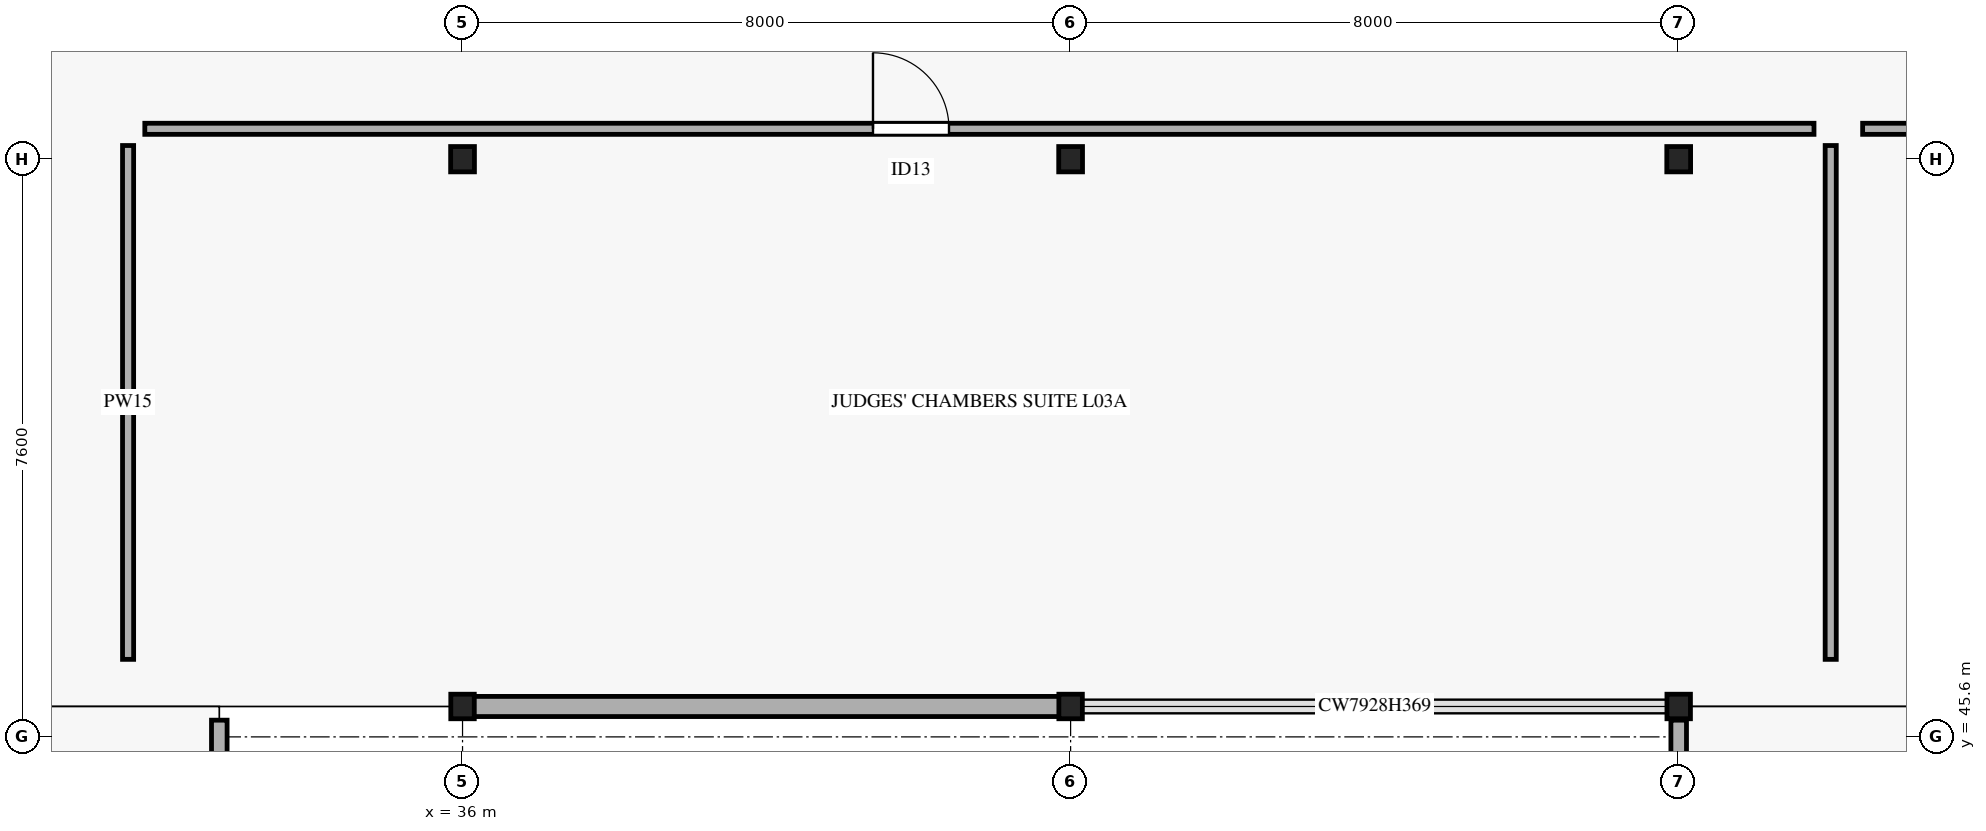
"""IFC4 building model, lengths in metres.
Left out: names, types, materials, properties, quantities, classifications, styles, units other than length and angle.
Written with IfcOpenShell. Run it as: python <this file> out.ifc"""

import sys

from ifc_helpers import new_model, si_unit, direction, frame, frame_2d, origin, origin_2d, place, context, subcontext, project, spatial, rectangle, i_section, extrude, element, fill, save


model = new_model("IFC4")
c1 = context("Model", 3, precision=1e-05, world=origin(), true_north=direction((0.0, 1.0)))
c2 = subcontext(c1, "Body", "Model", "MODEL_VIEW")
j1 = project(units=[si_unit("LENGTHUNIT", "METRE"), si_unit("PLANEANGLEUNIT", "RADIAN")], contexts=[c1])
p1 = place(None, origin())
s1 = spatial("IfcSite", under=j1, at=p1, CompositionType="ELEMENT")
p2 = place(p1, origin())
s2 = spatial("IfcBuilding", under=s1, at=p2, CompositionType="ELEMENT")
p3 = place(p2, frame((0.0, 0.0, 15.6)))
s3 = spatial("IfcBuildingStorey", under=s2, at=p3, CompositionType="ELEMENT", Elevation=15.6)
p4 = place(p3, frame((36.0, 46.0, 0.0), z_axis=(0.0, 0.0, 1.0), x_axis=(1.0, 0.0, 0.0)))
e1 = element("IfcColumn", 1, at=p4, inside=s3, PredefinedType="COLUMN", context=c2, shape_type="SweptSolid", body=[
    extrude(i_section(OverallWidth=0.309, OverallDepth=0.323, WebThickness=0.014, FlangeThickness=0.023, FilletRadius=0.015, at=origin_2d()), origin(), (0.0, 0.0, 1.0), 4.59),
])
p5 = place(p3, frame((36.0, 53.2, 0.0), z_axis=(0.0, 0.0, 1.0), x_axis=(1.0, 0.0, 0.0)))
e2 = element("IfcColumn", 2, at=p5, inside=s3, PredefinedType="COLUMN", context=c2, shape_type="SweptSolid", body=[
    extrude(i_section(OverallWidth=0.313, OverallDepth=0.333, WebThickness=0.018, FlangeThickness=0.028, FilletRadius=0.015, at=origin_2d()), origin(), (0.0, 0.0, 1.0), 4.59),
])
p6 = place(p3, frame((44.0, 46.0, 0.0), z_axis=(0.0, 0.0, 1.0), x_axis=(1.0, 0.0, 0.0)))
e3 = element("IfcColumn", 3, at=p6, inside=s3, PredefinedType="COLUMN", context=c2, shape_type="SweptSolid", body=[
    extrude(i_section(OverallWidth=0.309, OverallDepth=0.323, WebThickness=0.014, FlangeThickness=0.023, FilletRadius=0.015, at=origin_2d()), origin(), (0.0, 0.0, 1.0), 4.59),
])
p7 = place(p3, frame((44.0, 53.2, 0.0), z_axis=(0.0, 0.0, 1.0), x_axis=(1.0, 0.0, 0.0)))
e4 = element("IfcColumn", 4, at=p7, inside=s3, PredefinedType="COLUMN", context=c2, shape_type="SweptSolid", body=[
    extrude(i_section(OverallWidth=0.313, OverallDepth=0.333, WebThickness=0.018, FlangeThickness=0.028, FilletRadius=0.015, at=origin_2d()), origin(), (0.0, 0.0, 1.0), 4.59),
])
p8 = place(p3, frame((52.0, 46.0, 0.0), z_axis=(0.0, 0.0, 1.0), x_axis=(1.0, 0.0, 0.0)))
e5 = element("IfcColumn", 5, at=p8, inside=s3, PredefinedType="COLUMN", context=c2, shape_type="SweptSolid", body=[
    extrude(i_section(OverallWidth=0.309, OverallDepth=0.323, WebThickness=0.014, FlangeThickness=0.023, FilletRadius=0.015, at=origin_2d()), origin(), (0.0, 0.0, 1.0), 4.59),
])
p9 = place(p3, frame((52.0, 53.2, 0.0), z_axis=(0.0, 0.0, 1.0), x_axis=(1.0, 0.0, 0.0)))
e6 = element("IfcColumn", 6, at=p9, inside=s3, PredefinedType="COLUMN", context=c2, shape_type="SweptSolid", body=[
    extrude(i_section(OverallWidth=0.313, OverallDepth=0.333, WebThickness=0.018, FlangeThickness=0.028, FilletRadius=0.015, at=origin_2d()), origin(), (0.0, 0.0, 1.0), 4.59),
])
p10 = place(p3, frame((44.02, 46.0, 0.0), z_axis=(0.0, 0.0, 1.0), x_axis=(-1.0, 0.0, 0.0)))
e7 = element("IfcWall", 7, at=p10, inside=s3, PredefinedType="STANDARD", context=c2, shape_type="SweptSolid", body=[
    extrude(rectangle(XDim=8.04, YDim=0.265, at=frame_2d((4.02, 0.0))), origin(), (0.0, 0.0, 1.0), 3.66),
])
p11 = place(p3, frame((32.8, 45.82, 0.0), z_axis=(0.0, 0.0, 1.0), x_axis=(0.0, -1.0, 0.0)))
e8 = element("IfcWall", 8, at=p11, inside=s3, PredefinedType="STANDARD", context=c2, shape_type="SweptSolid", body=[
    extrude(rectangle(XDim=22.84, YDim=0.205, at=frame_2d((11.42, 0.0))), origin(), (0.0, 0.0, 1.0), 4.02),
])
p12 = place(p11, frame((10.195, 0.0, 0.85)))
e9 = element("IfcOpeningElement", 9, at=p12, cuts=e8, PredefinedType="OPENING", context=c2, shape_type="SweptSolid", body=[
    extrude(rectangle(XDim=2.45, YDim=1.55, at=frame_2d((1.225, 0.775))), frame((0.0, 0.113, 0.0), z_axis=(0.0, -1.0, 0.0), x_axis=(1.0, 0.0, 0.0)), (0.0, 0.0, 1.0), 0.225),
])
p13 = place(p3, frame((52.0, 22.98, 0.0), z_axis=(0.0, 0.0, 1.0), x_axis=(0.0, 1.0, 0.0)))
e10 = element("IfcWall", 10, at=p13, inside=s3, PredefinedType="STANDARD", context=c2, shape_type="SweptSolid", body=[
    extrude(rectangle(XDim=22.84, YDim=0.205, at=frame_2d((11.42, 0.0))), origin(), (0.0, 0.0, 1.0), 4.02),
])
p14 = place(p13, frame((10.195, 0.0, 0.85)))
e11 = element("IfcOpeningElement", 11, at=p14, cuts=e10, PredefinedType="OPENING", context=c2, shape_type="SweptSolid", body=[
    extrude(rectangle(XDim=2.45, YDim=1.55, at=frame_2d((1.225, 0.775))), frame((0.0, 0.113, 0.0), z_axis=(0.0, -1.0, 0.0), x_axis=(1.0, 0.0, 0.0)), (0.0, 0.0, 1.0), 0.225),
])
p15 = place(p3, frame((31.82, 53.6, 0.0), z_axis=(0.0, 0.0, 1.0), x_axis=(1.0, 0.0, 0.0)))
e12 = element("IfcWall", 12, at=p15, inside=s3, PredefinedType="PARTITIONING", context=c2, shape_type="SweptSolid", body=[
    extrude(rectangle(XDim=21.96, YDim=0.146, at=frame_2d((10.98, 0.0))), origin(), (0.0, 0.0, 1.0), 3.45),
])
p16 = place(p15, frame((9.58, 0.0, 0.0)))
e13 = element("IfcOpeningElement", 13, at=p16, cuts=e12, PredefinedType="OPENING", context=c2, shape_type="SweptSolid", body=[
    extrude(rectangle(XDim=1.0, YDim=2.3, at=frame_2d((0.5, 1.15))), frame((0.0, 0.083, 0.0), z_axis=(0.0, -1.0, 0.0), x_axis=(1.0, 0.0, 0.0)), (0.0, 0.0, 1.0), 0.166),
])
for number, where, z_axis, x_axis in (
    (14, (31.6, 46.62, 0.0), (0.0, 0.0, 1.0), (0.0, 1.0, 0.0)),
    (15, (54.0, 46.62, 0.0), (0.0, 0.0, 1.0), (0.0, 1.0, 0.0)),
):
    element("IfcWall", number, at=place(p3, frame(where, z_axis=z_axis, x_axis=x_axis)), inside=s3, PredefinedType="PARTITIONING", context=c2, shape_type="SweptSolid", body=[
        extrude(rectangle(XDim=6.76, YDim=0.146, at=frame_2d((3.38, 0.0))), origin(), (0.0, 0.0, 1.0), 3.45),
    ])
p17 = place(p3, frame((54.42, 53.6, 0.0), z_axis=(0.0, 0.0, 1.0), x_axis=(1.0, 0.0, 0.0)))
e16 = element("IfcWall", 16, at=p17, inside=s3, PredefinedType="PARTITIONING", context=c2, shape_type="SweptSolid", body=[
    extrude(rectangle(XDim=52.96, YDim=0.146, at=frame_2d((26.48, 0.0))), origin(), (0.0, 0.0, 1.0), 3.45),
])
p18 = place(p17, frame((26.0, 0.0, 0.0)))
e17 = element("IfcOpeningElement", 17, at=p18, cuts=e16, PredefinedType="OPENING", context=c2, shape_type="SweptSolid", body=[
    extrude(rectangle(XDim=0.96, YDim=2.25, at=frame_2d((0.48, 1.125))), frame((0.0, 0.083, 0.0), z_axis=(0.0, -1.0, 0.0), x_axis=(1.0, 0.0, 0.0)), (0.0, 0.0, 1.0), 0.166),
])
p19 = place(p16, origin())
e18 = element("IfcDoor", 18, at=p19, inside=s3, OperationType="SINGLE_SWING_LEFT", PredefinedType="DOOR", context=c2, shape_type="SweptSolid", body=[
    extrude(rectangle(XDim=1.0, YDim=2.3, at=frame_2d((0.5, 1.15))), frame((0.0, 0.025, 0.0), z_axis=(0.0, -1.0, 0.0), x_axis=(1.0, 0.0, 0.0)), (0.0, 0.0, 1.0), 0.05),
])
fill(e13, e18)
save(model, sys.argv[1])
